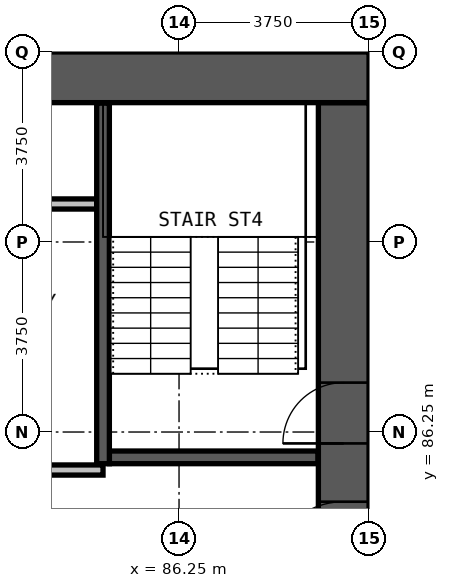
"""IFC4 building model, lengths in metres.
Left out: names, types, materials, properties, quantities, classifications, styles, units other than length and angle.
Written with IfcOpenShell. Run it as: python <this file> out.ifc"""

import sys

from ifc_helpers import new_model, si_unit, direction, frame, frame_2d, origin, place, context, subcontext, project, spatial, rectangle, extrude, element, fill, save


model = new_model("IFC4")
c1 = context("Model", 3, precision=1e-05, world=origin(), true_north=direction((0.0, 1.0)))
c2 = subcontext(c1, "Body", "Model", "MODEL_VIEW")
j1 = project(units=[si_unit("LENGTHUNIT", "METRE"), si_unit("PLANEANGLEUNIT", "RADIAN")], contexts=[c1])
p1 = place(None, origin())
s1 = spatial("IfcSite", under=j1, at=p1, CompositionType="ELEMENT")
p2 = place(p1, origin())
s2 = spatial("IfcBuilding", under=s1, at=p2, CompositionType="ELEMENT")
p3 = place(p2, frame((0.0, 0.0, 69.2)))
s3 = spatial("IfcBuildingStorey", under=s2, at=p3, CompositionType="ELEMENT", Elevation=69.2)
p4 = place(p3, frame((89.5, 72.25, 0.0), z_axis=(0.0, 0.0, 1.0), x_axis=(0.0, 1.0, 0.0)))
e1 = element("IfcWall", 1, at=p4, inside=s3, PredefinedType="SHEAR", context=c2, shape_type="SweptSolid", body=[
    extrude(rectangle(XDim=20.5, YDim=1.0, at=frame_2d((10.25, 0.0))), origin(), (0.0, 0.0, 1.0), 3.3),
])
p5 = place(p4, frame((0.275, 0.0, 0.0)))
e2 = element("IfcOpeningElement", 2, at=p5, cuts=e1, PredefinedType="OPENING", context=c2, shape_type="SweptSolid", body=[
    extrude(rectangle(XDim=1.2, YDim=2.2, at=frame_2d((0.6, 1.1))), frame((0.0, 0.51, 0.0), z_axis=(0.0, -1.0, 0.0), x_axis=(1.0, 0.0, 0.0)), (0.0, 0.0, 1.0), 1.02),
])
p6 = place(p4, frame((13.775, 0.0, 0.0)))
e3 = element("IfcOpeningElement", 3, at=p6, cuts=e1, PredefinedType="OPENING", context=c2, shape_type="SweptSolid", body=[
    extrude(rectangle(XDim=1.2, YDim=2.2, at=frame_2d((0.6, 1.1))), frame((0.0, 0.51, 0.0), z_axis=(0.0, -1.0, 0.0), x_axis=(1.0, 0.0, 0.0)), (0.0, 0.0, 1.0), 1.02),
])
p7 = place(p4, frame((7.875, 0.0, 0.0)))
e4 = element("IfcOpeningElement", 4, at=p7, cuts=e1, PredefinedType="OPENING", context=c2, shape_type="SweptSolid", body=[
    extrude(rectangle(XDim=1.5, YDim=2.2, at=frame_2d((0.75, 1.1))), frame((0.0, 0.51, 0.0), z_axis=(0.0, -1.0, 0.0), x_axis=(1.0, 0.0, 0.0)), (0.0, 0.0, 1.0), 1.02),
])
p8 = place(p4, frame((11.125, 0.0, 0.0)))
e5 = element("IfcOpeningElement", 5, at=p8, cuts=e1, PredefinedType="OPENING", context=c2, shape_type="SweptSolid", body=[
    extrude(rectangle(XDim=1.5, YDim=2.2, at=frame_2d((0.75, 1.1))), frame((0.0, 0.51, 0.0), z_axis=(0.0, -1.0, 0.0), x_axis=(1.0, 0.0, 0.0)), (0.0, 0.0, 1.0), 1.02),
])
p9 = place(p3, frame((90.0, 93.25, 0.0), z_axis=(0.0, 0.0, 1.0), x_axis=(-1.0, 0.0, 0.0)))
e6 = element("IfcWall", 6, at=p9, inside=s3, PredefinedType="SHEAR", context=c2, shape_type="SweptSolid", body=[
    extrude(rectangle(XDim=30.0, YDim=1.0, at=frame_2d((15.0, 0.0))), origin(), (0.0, 0.0, 1.0), 3.3),
])
p10 = place(p3, frame((75.1, 85.5, 0.0), z_axis=(0.0, 0.0, 1.0), x_axis=(1.0, 0.0, 0.0)))
e7 = element("IfcWall", 7, at=p10, inside=s3, PredefinedType="PARTITIONING", context=c2, shape_type="SweptSolid", body=[
    extrude(rectangle(XDim=9.65, YDim=0.2, at=frame_2d((4.825, 0.0))), origin(), (0.0, 0.0, 1.0), 3.0),
])
p11 = place(p10, frame((1.0, 0.0, 0.0)))
e8 = element("IfcOpeningElement", 8, at=p11, cuts=e7, PredefinedType="OPENING", context=c2, shape_type="SweptSolid", body=[
    extrude(rectangle(XDim=0.9, YDim=2.2, at=frame_2d((0.45, 1.1))), frame((0.0, 0.11, 0.0), z_axis=(0.0, -1.0, 0.0), x_axis=(1.0, 0.0, 0.0)), (0.0, 0.0, 1.0), 0.22),
])
p12 = place(p10, frame((4.2, 0.0, 0.0)))
e9 = element("IfcOpeningElement", 9, at=p12, cuts=e7, PredefinedType="OPENING", context=c2, shape_type="SweptSolid", body=[
    extrude(rectangle(XDim=0.9, YDim=2.2, at=frame_2d((0.45, 1.1))), frame((0.0, 0.11, 0.0), z_axis=(0.0, -1.0, 0.0), x_axis=(1.0, 0.0, 0.0)), (0.0, 0.0, 1.0), 0.22),
])
p13 = place(p10, frame((7.55, 0.0, 0.0)))
e10 = element("IfcOpeningElement", 10, at=p13, cuts=e7, PredefinedType="OPENING", context=c2, shape_type="SweptSolid", body=[
    extrude(rectangle(XDim=0.9, YDim=2.2, at=frame_2d((0.45, 1.1))), frame((0.0, 0.11, 0.0), z_axis=(0.0, -1.0, 0.0), x_axis=(1.0, 0.0, 0.0)), (0.0, 0.0, 1.0), 0.22),
])
p14 = place(p3, frame((75.26, 90.75, 0.0), z_axis=(0.0, 0.0, 1.0), x_axis=(1.0, 0.0, 0.0)))
e11 = element("IfcWall", 11, at=p14, inside=s3, PredefinedType="PARTITIONING", context=c2, shape_type="SweptSolid", body=[
    extrude(rectangle(XDim=9.365, YDim=0.2, at=frame_2d((4.683, 0.0))), origin(), (0.0, 0.0, 1.0), 3.0),
])
p15 = place(p3, frame((84.875, 85.75, 0.0), z_axis=(0.0, 0.0, 1.0), x_axis=(1.0, 0.0, 0.0)))
e12 = element("IfcWall", 12, at=p15, inside=s3, PredefinedType="PARTITIONING", context=c2, shape_type="SweptSolid", body=[
    extrude(rectangle(XDim=4.115, YDim=0.25, at=frame_2d((2.058, 0.0))), origin(), (0.0, 0.0, 1.0), 3.0),
])
p16 = place(p3, frame((84.75, 85.625, 0.0), z_axis=(0.0, 0.0, 1.0), x_axis=(0.0, 1.0, 0.0)))
e13 = element("IfcWall", 13, at=p16, inside=s3, PredefinedType="PARTITIONING", context=c2, shape_type="SweptSolid", body=[
    extrude(rectangle(XDim=7.115, YDim=0.25, at=frame_2d((3.558, 0.0))), origin(), (0.0, 0.0, 1.0), 3.0),
])
p17 = place(p6, origin())
e14 = element("IfcDoor", 14, at=p17, inside=s3, OperationType="SINGLE_SWING_RIGHT", PredefinedType="DOOR", context=c2, shape_type="SweptSolid", body=[
    extrude(rectangle(XDim=1.2, YDim=2.2, at=frame_2d((0.6, 1.1))), frame((0.0, 0.025, 0.0), z_axis=(0.0, -1.0, 0.0), x_axis=(1.0, 0.0, 0.0)), (0.0, 0.0, 1.0), 0.05),
])
fill(e3, e14)
p18 = place(p8, origin())
e15 = element("IfcDoor", 15, at=p18, inside=s3, OperationType="DOUBLE_DOOR_SINGLE_SWING", PredefinedType="DOOR", context=c2, shape_type="SweptSolid", body=[
    extrude(rectangle(XDim=1.5, YDim=2.2, at=frame_2d((0.75, 1.1))), frame((0.0, 0.025, 0.0), z_axis=(0.0, -1.0, 0.0), x_axis=(1.0, 0.0, 0.0)), (0.0, 0.0, 1.0), 0.05),
])
fill(e5, e15)
save(model, sys.argv[1])
